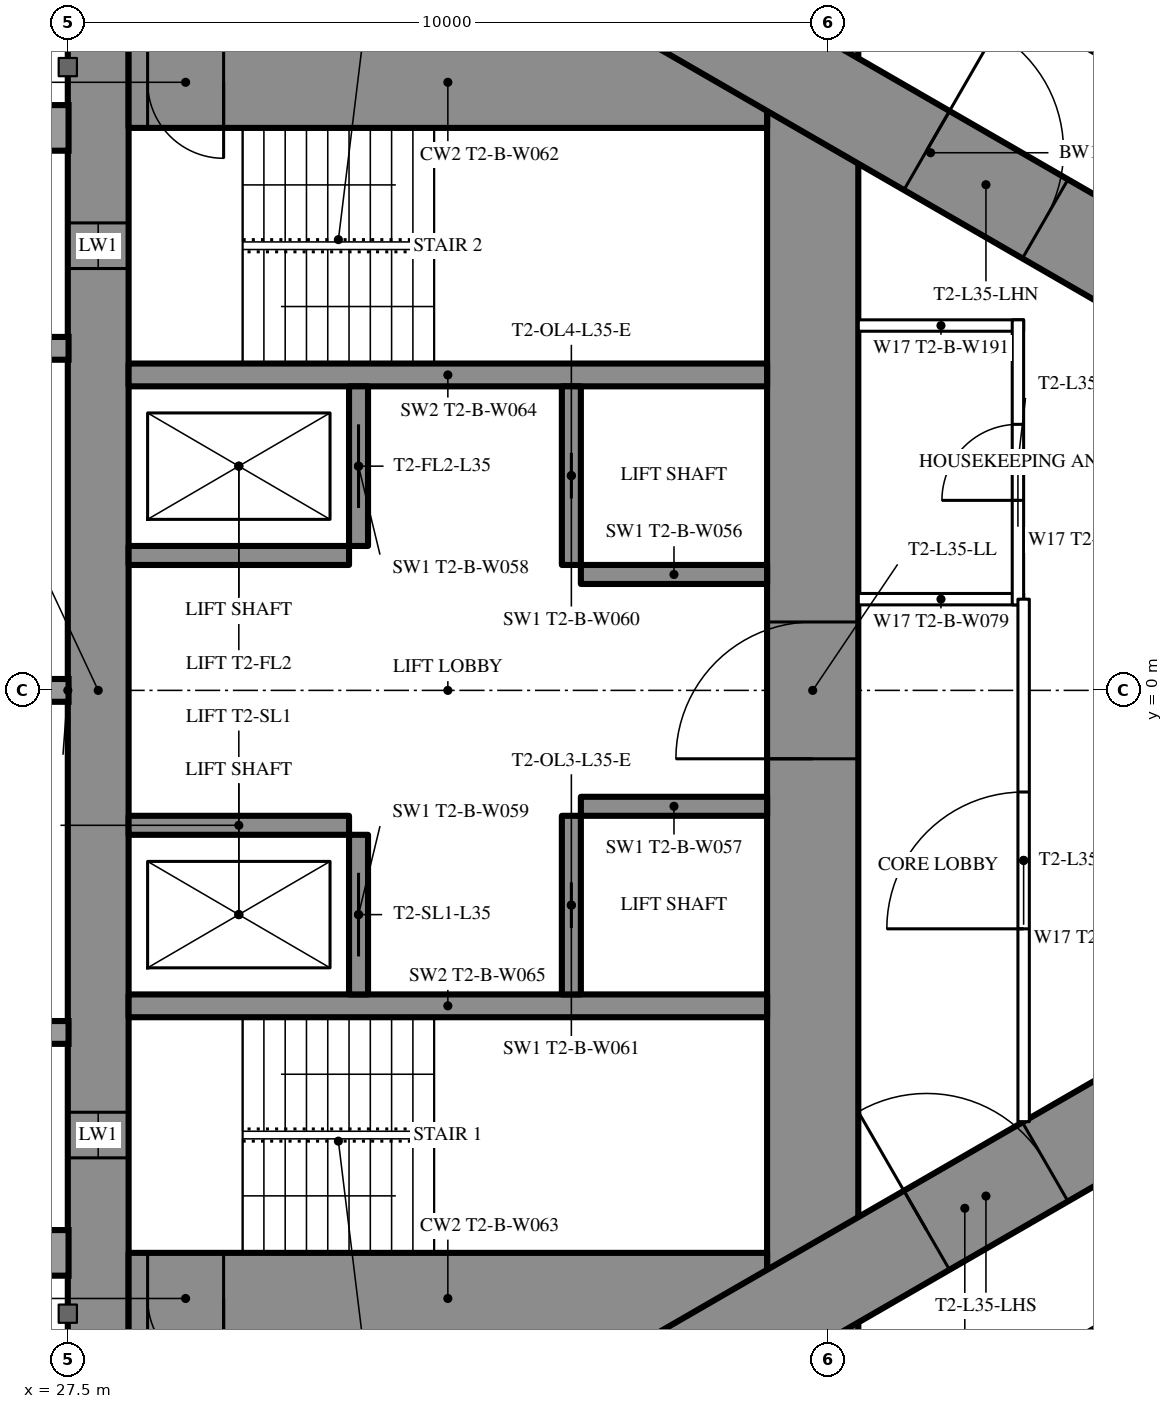
"""IFC4 building model, lengths in metres.
Left out: names, types, materials, properties, quantities, classifications, styles, units other than length and angle.
Written with IfcOpenShell. Run it as: python <this file> out.ifc"""

import sys

from ifc_helpers import new_model, si_unit, direction, frame, frame_2d, origin, place, context, subcontext, project, spatial, rectangle, extrude, element, fill, save


model = new_model("IFC4")
c1 = context("Model", 3, precision=1e-05, world=origin(), true_north=direction((0.0, 1.0)))
c2 = subcontext(c1, "Body", "Model", "MODEL_VIEW")
j1 = project(units=[si_unit("LENGTHUNIT", "METRE"), si_unit("PLANEANGLEUNIT", "RADIAN")], contexts=[c1])
p1 = place(None, origin())
s1 = spatial("IfcSite", under=j1, at=p1, CompositionType="ELEMENT")
p2 = place(p1, origin())
s2 = spatial("IfcBuilding", under=s1, at=p2, CompositionType="ELEMENT")
p3 = place(p2, frame((0.0, 0.0, 132.6)))
s3 = spatial("IfcBuildingStorey", under=s2, at=p3, CompositionType="ELEMENT", Elevation=132.6)
p4 = place(p3, frame((27.9, -8.6, 0.0), z_axis=(0.0, 0.0, 1.0), x_axis=(0.0, 1.0, 0.0)))
e1 = element("IfcWall", 1, at=p4, inside=s3, PredefinedType="SHEAR", context=c2, shape_type="SweptSolid", body=[
    extrude(rectangle(XDim=17.2, YDim=0.8, at=frame_2d((8.6, 0.0))), origin(), (0.0, 0.0, 1.0), 3.5),
])
p5 = place(p4, frame((2.45, 0.0, 0.6)))
e2 = element("IfcOpeningElement", 2, at=p5, cuts=e1, PredefinedType="OPENING", context=c2, shape_type="SweptSolid", body=[
    extrude(rectangle(XDim=0.6, YDim=2.1, at=frame_2d((0.3, 1.05))), frame((0.0, 0.41, 0.0), z_axis=(0.0, -1.0, 0.0), x_axis=(1.0, 0.0, 0.0)), (0.0, 0.0, 1.0), 0.82),
])
p6 = place(p4, frame((14.15, 0.0, 0.6)))
e3 = element("IfcOpeningElement", 3, at=p6, cuts=e1, PredefinedType="OPENING", context=c2, shape_type="SweptSolid", body=[
    extrude(rectangle(XDim=0.6, YDim=2.1, at=frame_2d((0.3, 1.05))), frame((0.0, 0.41, 0.0), z_axis=(0.0, -1.0, 0.0), x_axis=(1.0, 0.0, 0.0)), (0.0, 0.0, 1.0), 0.82),
])
p7 = place(p3, frame((37.3, -8.6, 0.0), z_axis=(0.0, 0.0, 1.0), x_axis=(0.0, 1.0, 0.0)))
e4 = element("IfcWall", 4, at=p7, inside=s3, PredefinedType="SHEAR", context=c2, shape_type="SweptSolid", body=[
    extrude(rectangle(XDim=17.2, YDim=1.2, at=frame_2d((8.6, 0.0))), origin(), (0.0, 0.0, 1.0), 3.5),
])
p8 = place(p7, frame((7.7, 0.0, 0.0)))
e5 = element("IfcOpeningElement", 5, at=p8, cuts=e4, PredefinedType="OPENING", context=c2, shape_type="SweptSolid", body=[
    extrude(rectangle(XDim=1.8, YDim=2.2, at=frame_2d((0.9, 1.1))), frame((0.0, 0.61, 0.0), z_axis=(0.0, -1.0, 0.0), x_axis=(1.0, 0.0, 0.0)), (0.0, 0.0, 1.0), 1.22),
])
p9 = place(p3, frame((28.3, -8.0, 0.0), z_axis=(0.0, 0.0, 1.0), x_axis=(1.0, 0.0, 0.0)))
e6 = element("IfcWall", 6, at=p9, inside=s3, PredefinedType="SHEAR", context=c2, shape_type="SweptSolid", body=[
    extrude(rectangle(XDim=8.4, YDim=1.2, at=frame_2d((4.2, 0.0))), origin(), (0.0, 0.0, 1.0), 3.5),
])
p10 = place(p9, frame((0.25, 0.0, 0.0)))
e7 = element("IfcOpeningElement", 7, at=p10, cuts=e6, PredefinedType="OPENING", context=c2, shape_type="SweptSolid", body=[
    extrude(rectangle(XDim=1.0, YDim=2.2, at=frame_2d((0.5, 1.1))), frame((0.0, 0.61, 0.0), z_axis=(0.0, -1.0, 0.0), x_axis=(1.0, 0.0, 0.0)), (0.0, 0.0, 1.0), 1.22),
])
p11 = place(p3, frame((28.3, 8.0, 0.0), z_axis=(0.0, 0.0, 1.0), x_axis=(1.0, 0.0, 0.0)))
e8 = element("IfcWall", 8, at=p11, inside=s3, PredefinedType="SHEAR", context=c2, shape_type="SweptSolid", body=[
    extrude(rectangle(XDim=8.4, YDim=1.2, at=frame_2d((4.2, 0.0))), origin(), (0.0, 0.0, 1.0), 3.5),
])
p12 = place(p11, frame((0.25, 0.0, 0.0)))
e9 = element("IfcOpeningElement", 9, at=p12, cuts=e8, PredefinedType="OPENING", context=c2, shape_type="SweptSolid", body=[
    extrude(rectangle(XDim=1.0, YDim=2.2, at=frame_2d((0.5, 1.1))), frame((0.0, 0.61, 0.0), z_axis=(0.0, -1.0, 0.0), x_axis=(1.0, 0.0, 0.0)), (0.0, 0.0, 1.0), 1.22),
])
for number, where, z_axis, x_axis in (
    (10, (28.3, -4.15, 0.0), (0.0, 0.0, 1.0), (1.0, 0.0, 0.0)),
    (11, (28.3, 4.15, 0.0), (0.0, 0.0, 1.0), (1.0, 0.0, 0.0)),
):
    element("IfcWall", number, at=place(p3, frame(where, z_axis=z_axis, x_axis=x_axis)), inside=s3, PredefinedType="SHEAR", context=c2, shape_type="SweptSolid", body=[
        extrude(rectangle(XDim=8.4, YDim=0.3, at=frame_2d((4.2, 0.0))), origin(), (0.0, 0.0, 1.0), 3.5),
    ])
p13 = place(p3, frame((31.325, -4.0, 0.0), z_axis=(0.0, 0.0, 1.0), x_axis=(0.0, 1.0, 0.0)))
e12 = element("IfcWall", 12, at=p13, inside=s3, PredefinedType="SHEAR", context=c2, shape_type="SweptSolid", body=[
    extrude(rectangle(XDim=2.1, YDim=0.25, at=frame_2d((1.05, 0.0))), origin(), (0.0, 0.0, 1.0), 3.5),
])
p14 = place(p13, frame((0.5, 0.0, 0.0)))
e13 = element("IfcOpeningElement", 13, at=p14, cuts=e12, PredefinedType="OPENING", context=c2, shape_type="SweptSolid", body=[
    extrude(rectangle(XDim=1.1, YDim=2.2, at=frame_2d((0.55, 1.1))), frame((0.0, 0.135, 0.0), z_axis=(0.0, -1.0, 0.0), x_axis=(1.0, 0.0, 0.0)), (0.0, 0.0, 1.0), 0.27),
])
p15 = place(p3, frame((34.125, -4.0, 0.0), z_axis=(0.0, 0.0, 1.0), x_axis=(0.0, 1.0, 0.0)))
e14 = element("IfcWall", 14, at=p15, inside=s3, PredefinedType="SHEAR", context=c2, shape_type="SweptSolid", body=[
    extrude(rectangle(XDim=2.35, YDim=0.25, at=frame_2d((1.175, 0.0))), origin(), (0.0, 0.0, 1.0), 3.5),
])
p16 = place(p15, frame((0.875, 0.0, 0.0)))
e15 = element("IfcOpeningElement", 15, at=p16, cuts=e14, PredefinedType="OPENING", context=c2, shape_type="SweptSolid", body=[
    extrude(rectangle(XDim=0.6, YDim=2.0, at=frame_2d((0.3, 1.0))), frame((0.0, 0.135, 0.0), z_axis=(0.0, -1.0, 0.0), x_axis=(1.0, 0.0, 0.0)), (0.0, 0.0, 1.0), 0.27),
])
p17 = place(p3, frame((28.3, -1.775, 0.0), z_axis=(0.0, 0.0, 1.0), x_axis=(1.0, 0.0, 0.0)))
e16 = element("IfcWall", 16, at=p17, inside=s3, PredefinedType="SHEAR", context=c2, shape_type="SweptSolid", body=[
    extrude(rectangle(XDim=2.9, YDim=0.25, at=frame_2d((1.45, 0.0))), origin(), (0.0, 0.0, 1.0), 3.5),
])
p18 = place(p3, frame((34.25, -1.525, 0.0), z_axis=(0.0, 0.0, 1.0), x_axis=(1.0, 0.0, 0.0)))
e17 = element("IfcWall", 17, at=p18, inside=s3, PredefinedType="SHEAR", context=c2, shape_type="SweptSolid", body=[
    extrude(rectangle(XDim=2.45, YDim=0.25, at=frame_2d((1.225, 0.0))), origin(), (0.0, 0.0, 1.0), 3.5),
])
p19 = place(p3, frame((31.325, 1.9, 0.0), z_axis=(0.0, 0.0, 1.0), x_axis=(0.0, 1.0, 0.0)))
e18 = element("IfcWall", 18, at=p19, inside=s3, PredefinedType="SHEAR", context=c2, shape_type="SweptSolid", body=[
    extrude(rectangle(XDim=2.1, YDim=0.25, at=frame_2d((1.05, 0.0))), origin(), (0.0, 0.0, 1.0), 3.5),
])
p20 = place(p19, frame((0.5, 0.0, 0.0)))
e19 = element("IfcOpeningElement", 19, at=p20, cuts=e18, PredefinedType="OPENING", context=c2, shape_type="SweptSolid", body=[
    extrude(rectangle(XDim=1.1, YDim=2.2, at=frame_2d((0.55, 1.1))), frame((0.0, 0.135, 0.0), z_axis=(0.0, -1.0, 0.0), x_axis=(1.0, 0.0, 0.0)), (0.0, 0.0, 1.0), 0.27),
])
p21 = place(p3, frame((34.125, 1.65, 0.0), z_axis=(0.0, 0.0, 1.0), x_axis=(0.0, 1.0, 0.0)))
e20 = element("IfcWall", 20, at=p21, inside=s3, PredefinedType="SHEAR", context=c2, shape_type="SweptSolid", body=[
    extrude(rectangle(XDim=2.35, YDim=0.25, at=frame_2d((1.175, 0.0))), origin(), (0.0, 0.0, 1.0), 3.5),
])
p22 = place(p21, frame((0.875, 0.0, 0.0)))
e21 = element("IfcOpeningElement", 21, at=p22, cuts=e20, PredefinedType="OPENING", context=c2, shape_type="SweptSolid", body=[
    extrude(rectangle(XDim=0.6, YDim=2.0, at=frame_2d((0.3, 1.0))), frame((0.0, 0.135, 0.0), z_axis=(0.0, -1.0, 0.0), x_axis=(1.0, 0.0, 0.0)), (0.0, 0.0, 1.0), 0.27),
])
p23 = place(p3, frame((28.3, 1.775, 0.0), z_axis=(0.0, 0.0, 1.0), x_axis=(1.0, 0.0, 0.0)))
e22 = element("IfcWall", 22, at=p23, inside=s3, PredefinedType="SHEAR", context=c2, shape_type="SweptSolid", body=[
    extrude(rectangle(XDim=2.9, YDim=0.25, at=frame_2d((1.45, 0.0))), origin(), (0.0, 0.0, 1.0), 3.5),
])
p24 = place(p3, frame((34.25, 1.525, 0.0), z_axis=(0.0, 0.0, 1.0), x_axis=(1.0, 0.0, 0.0)))
e23 = element("IfcWall", 23, at=p24, inside=s3, PredefinedType="SHEAR", context=c2, shape_type="SweptSolid", body=[
    extrude(rectangle(XDim=2.45, YDim=0.25, at=frame_2d((1.225, 0.0))), origin(), (0.0, 0.0, 1.0), 3.5),
])
p25 = place(p3, frame((27.2, -13.8, 0.0), z_axis=(0.0, 0.0, 1.0), x_axis=(0.866027159892, 0.499996958321, 0.0)))
e24 = element("IfcWall", 24, at=p25, inside=s3, PredefinedType="SHEAR", context=c2, shape_type="SweptSolid", body=[
    extrude(rectangle(XDim=27.947, YDim=1.2, at=frame_2d((13.973, 0.0))), origin(), (0.0, 0.0, 1.0), 3.5),
])
p26 = place(p25, frame((4.6, 0.0, 0.0)))
e25 = element("IfcOpeningElement", 25, at=p26, cuts=e24, PredefinedType="OPENING", context=c2, shape_type="SweptSolid", body=[
    extrude(rectangle(XDim=1.0, YDim=2.2, at=frame_2d((0.5, 1.1))), frame((0.0, 0.61, 0.0), z_axis=(0.0, -1.0, 0.0), x_axis=(1.0, 0.0, 0.0)), (0.0, 0.0, 1.0), 1.22),
])
p27 = place(p25, frame((13.395, 0.0, 0.0)))
e26 = element("IfcOpeningElement", 26, at=p27, cuts=e24, PredefinedType="OPENING", context=c2, shape_type="SweptSolid", body=[
    extrude(rectangle(XDim=1.8, YDim=2.2, at=frame_2d((0.9, 1.1))), frame((0.0, 0.61, 0.0), z_axis=(0.0, -1.0, 0.0), x_axis=(1.0, 0.0, 0.0)), (0.0, 0.0, 1.0), 1.22),
])
p28 = place(p3, frame((27.2, 13.8, 0.0), z_axis=(0.0, 0.0, 1.0), x_axis=(0.866024515034, -0.500001539357, 0.0)))
e27 = element("IfcWall", 27, at=p28, inside=s3, PredefinedType="SHEAR", context=c2, shape_type="SweptSolid", body=[
    extrude(rectangle(XDim=26.907, YDim=1.2, at=frame_2d((13.454, 0.0))), origin(), (0.0, 0.0, 1.0), 3.5),
])
p29 = place(p28, frame((4.6, 0.0, 0.0)))
e28 = element("IfcOpeningElement", 28, at=p29, cuts=e27, PredefinedType="OPENING", context=c2, shape_type="SweptSolid", body=[
    extrude(rectangle(XDim=1.0, YDim=2.2, at=frame_2d((0.5, 1.1))), frame((0.0, 0.61, 0.0), z_axis=(0.0, -1.0, 0.0), x_axis=(1.0, 0.0, 0.0)), (0.0, 0.0, 1.0), 1.22),
])
p30 = place(p28, frame((13.395, 0.0, 0.0)))
e29 = element("IfcOpeningElement", 29, at=p30, cuts=e27, PredefinedType="OPENING", context=c2, shape_type="SweptSolid", body=[
    extrude(rectangle(XDim=1.8, YDim=2.2, at=frame_2d((0.9, 1.1))), frame((0.0, 0.61, 0.0), z_axis=(0.0, -1.0, 0.0), x_axis=(1.0, 0.0, 0.0)), (0.0, 0.0, 1.0), 1.22),
])
p31 = place(p3, frame((37.96, -10.243, 0.0), z_axis=(0.0, 0.0, 1.0), x_axis=(0.866026429433, 0.499998223521, 0.0)))
e30 = element("IfcWall", 30, at=p31, inside=s3, PredefinedType="PARTITIONING", context=c2, shape_type="SweptSolid", body=[
    extrude(rectangle(XDim=20.487, YDim=0.2, at=frame_2d((10.243, 0.0))), origin(), (0.0, 0.0, 1.0), 3.25),
])
p32 = place(p31, frame((10.743, 0.0, 0.0)))
e31 = element("IfcOpeningElement", 31, at=p32, cuts=e30, PredefinedType="OPENING", context=c2, shape_type="SweptSolid", body=[
    extrude(rectangle(XDim=0.95, YDim=2.2, at=frame_2d((0.475, 1.1))), frame((0.0, 0.11, 0.0), z_axis=(0.0, -1.0, 0.0), x_axis=(1.0, 0.0, 0.0)), (0.0, 0.0, 1.0), 0.22),
])
p33 = place(p31, frame((17.586, 0.0, 0.0)))
e32 = element("IfcOpeningElement", 32, at=p33, cuts=e30, PredefinedType="OPENING", context=c2, shape_type="SweptSolid", body=[
    extrude(rectangle(XDim=1.8, YDim=2.2, at=frame_2d((0.9, 1.1))), frame((0.0, 0.11, 0.0), z_axis=(0.0, -1.0, 0.0), x_axis=(1.0, 0.0, 0.0)), (0.0, 0.0, 1.0), 0.22),
])
p34 = place(p31, frame((0.6, 0.0, 0.0)))
e33 = element("IfcOpeningElement", 33, at=p34, cuts=e30, PredefinedType="OPENING", context=c2, shape_type="SweptSolid", body=[
    extrude(rectangle(XDim=0.95, YDim=2.2, at=frame_2d((0.475, 1.1))), frame((0.0, 0.11, 0.0), z_axis=(0.0, -1.0, 0.0), x_axis=(1.0, 0.0, 0.0)), (0.0, 0.0, 1.0), 0.22),
])
p35 = place(p3, frame((36.834, 10.894, 0.0), z_axis=(0.0, 0.0, 1.0), x_axis=(0.866028157229, -0.499995230863, 0.0)))
e34 = element("IfcWall", 34, at=p35, inside=s3, PredefinedType="PARTITIONING", context=c2, shape_type="SweptSolid", body=[
    extrude(rectangle(XDim=21.667, YDim=0.2, at=frame_2d((10.833, 0.0))), origin(), (0.0, 0.0, 1.0), 3.25),
])
p36 = place(p35, frame((20.117, 0.0, 0.0)))
e35 = element("IfcOpeningElement", 35, at=p36, cuts=e34, PredefinedType="OPENING", context=c2, shape_type="SweptSolid", body=[
    extrude(rectangle(XDim=0.95, YDim=2.2, at=frame_2d((0.475, 1.1))), frame((0.0, 0.11, 0.0), z_axis=(0.0, -1.0, 0.0), x_axis=(1.0, 0.0, 0.0)), (0.0, 0.0, 1.0), 0.22),
])
p37 = place(p35, frame((14.938, 0.0, 0.0)))
e36 = element("IfcOpeningElement", 36, at=p37, cuts=e34, PredefinedType="OPENING", context=c2, shape_type="SweptSolid", body=[
    extrude(rectangle(XDim=1.8, YDim=2.2, at=frame_2d((0.9, 1.1))), frame((0.0, 0.11, 0.0), z_axis=(0.0, -1.0, 0.0), x_axis=(1.0, 0.0, 0.0)), (0.0, 0.0, 1.0), 0.22),
])
p38 = place(p35, frame((9.99, 0.0, 0.0)))
e37 = element("IfcOpeningElement", 37, at=p38, cuts=e34, PredefinedType="OPENING", context=c2, shape_type="SweptSolid", body=[
    extrude(rectangle(XDim=0.95, YDim=2.2, at=frame_2d((0.475, 1.1))), frame((0.0, 0.11, 0.0), z_axis=(0.0, -1.0, 0.0), x_axis=(1.0, 0.0, 0.0)), (0.0, 0.0, 1.0), 0.22),
])
p39 = place(p35, frame((3.35, 0.0, 0.0)))
e38 = element("IfcOpeningElement", 38, at=p39, cuts=e34, PredefinedType="OPENING", context=c2, shape_type="SweptSolid", body=[
    extrude(rectangle(XDim=1.0, YDim=2.2, at=frame_2d((0.5, 1.1))), frame((0.0, 0.11, 0.0), z_axis=(0.0, -1.0, 0.0), x_axis=(1.0, 0.0, 0.0)), (0.0, 0.0, 1.0), 0.22),
])
for number, where, z_axis, x_axis in (
    (39, (37.9, 1.2, 0.0), (0.0, 0.0, 1.0), (1.0, 0.0, 0.0)),
    (40, (37.9, 4.8, 0.0), (0.0, 0.0, 1.0), (1.0, 0.0, 0.0)),
):
    element("IfcWall", number, at=place(p3, frame(where, z_axis=z_axis, x_axis=x_axis)), inside=s3, PredefinedType="PARTITIONING", context=c2, shape_type="SweptSolid", body=[
        extrude(rectangle(XDim=2.175, YDim=0.15, at=frame_2d((1.087, 0.0))), origin(), (0.0, 0.0, 1.0), 3.25),
    ])
p40 = place(p3, frame((40.0, 1.125, 0.0), z_axis=(0.0, 0.0, 1.0), x_axis=(0.0, 1.0, 0.0)))
e41 = element("IfcWall", 41, at=p40, inside=s3, PredefinedType="PARTITIONING", context=c2, shape_type="SweptSolid", body=[
    extrude(rectangle(XDim=3.75, YDim=0.15, at=frame_2d((1.875, 0.0))), origin(), (0.0, 0.0, 1.0), 3.25),
])
p41 = place(p40, frame((1.375, 0.0, 0.0)))
e42 = element("IfcOpeningElement", 42, at=p41, cuts=e41, PredefinedType="OPENING", context=c2, shape_type="SweptSolid", body=[
    extrude(rectangle(XDim=1.0, YDim=2.2, at=frame_2d((0.5, 1.1))), frame((0.0, 0.085, 0.0), z_axis=(0.0, -1.0, 0.0), x_axis=(1.0, 0.0, 0.0)), (0.0, 0.0, 1.0), 0.17),
])
p42 = place(p3, frame((40.075, -5.674, 0.0), z_axis=(0.0, 0.0, 1.0), x_axis=(0.0, 1.0, 0.0)))
e43 = element("IfcWall", 43, at=p42, inside=s3, PredefinedType="PARTITIONING", context=c2, shape_type="SweptSolid", body=[
    extrude(rectangle(XDim=6.874, YDim=0.15, at=frame_2d((3.437, 0.0))), origin(), (0.0, 0.0, 1.0), 3.25),
])
p43 = place(p42, frame((2.537, 0.0, 0.0)))
e44 = element("IfcOpeningElement", 44, at=p43, cuts=e43, PredefinedType="OPENING", context=c2, shape_type="SweptSolid", body=[
    extrude(rectangle(XDim=1.8, YDim=2.2, at=frame_2d((0.9, 1.1))), frame((0.0, 0.085, 0.0), z_axis=(0.0, -1.0, 0.0), x_axis=(1.0, 0.0, 0.0)), (0.0, 0.0, 1.0), 0.17),
])
p44 = place(p41, origin())
e45 = element("IfcDoor", 45, at=p44, inside=s3, OperationType="SINGLE_SWING_LEFT", PredefinedType="DOOR", context=c2, shape_type="SweptSolid", body=[
    extrude(rectangle(XDim=1.0, YDim=2.2, at=frame_2d((0.5, 1.1))), frame((0.0, 0.025, 0.0), z_axis=(0.0, -1.0, 0.0), x_axis=(1.0, 0.0, 0.0)), (0.0, 0.0, 1.0), 0.05),
])
fill(e42, e45)
p45 = place(p43, origin())
e46 = element("IfcDoor", 46, at=p45, inside=s3, OperationType="DOUBLE_DOOR_SINGLE_SWING", PredefinedType="DOOR", context=c2, shape_type="SweptSolid", body=[
    extrude(rectangle(XDim=1.8, YDim=2.2, at=frame_2d((0.9, 1.1))), frame((0.0, 0.025, 0.0), z_axis=(0.0, -1.0, 0.0), x_axis=(1.0, 0.0, 0.0)), (0.0, 0.0, 1.0), 0.05),
])
fill(e44, e46)
p46 = place(p27, origin())
e47 = element("IfcDoor", 47, at=p46, inside=s3, OperationType="DOUBLE_DOOR_SINGLE_SWING", PredefinedType="DOOR", context=c2, shape_type="SweptSolid", body=[
    extrude(rectangle(XDim=1.8, YDim=2.2, at=frame_2d((0.9, 1.1))), frame((0.0, 0.025, 0.0), z_axis=(0.0, -1.0, 0.0), x_axis=(1.0, 0.0, 0.0)), (0.0, 0.0, 1.0), 0.05),
])
fill(e26, e47)
p47 = place(p30, origin())
e48 = element("IfcDoor", 48, at=p47, inside=s3, OperationType="DOUBLE_DOOR_SINGLE_SWING", PredefinedType="DOOR", context=c2, shape_type="SweptSolid", body=[
    extrude(rectangle(XDim=1.8, YDim=2.2, at=frame_2d((0.9, 1.1))), frame((0.0, 0.025, 0.0), z_axis=(0.0, -1.0, 0.0), x_axis=(1.0, 0.0, 0.0)), (0.0, 0.0, 1.0), 0.05),
])
fill(e29, e48)
p48 = place(p8, origin())
e49 = element("IfcDoor", 49, at=p48, inside=s3, OperationType="DOUBLE_DOOR_SINGLE_SWING", PredefinedType="DOOR", context=c2, shape_type="SweptSolid", body=[
    extrude(rectangle(XDim=1.8, YDim=2.2, at=frame_2d((0.9, 1.1))), frame((0.0, 0.025, 0.0), z_axis=(0.0, -1.0, 0.0), x_axis=(1.0, 0.0, 0.0)), (0.0, 0.0, 1.0), 0.05),
])
fill(e5, e49)
p49 = place(p10, origin())
e50 = element("IfcDoor", 50, at=p49, inside=s3, OperationType="SINGLE_SWING_RIGHT", PredefinedType="DOOR", context=c2, shape_type="SweptSolid", body=[
    extrude(rectangle(XDim=1.0, YDim=2.2, at=frame_2d((0.5, 1.1))), frame((0.0, 0.025, 0.0), z_axis=(0.0, -1.0, 0.0), x_axis=(1.0, 0.0, 0.0)), (0.0, 0.0, 1.0), 0.05),
])
fill(e7, e50)
p50 = place(p12, origin())
e51 = element("IfcDoor", 51, at=p50, inside=s3, OperationType="SINGLE_SWING_RIGHT", PredefinedType="DOOR", context=c2, shape_type="SweptSolid", body=[
    extrude(rectangle(XDim=1.0, YDim=2.2, at=frame_2d((0.5, 1.1))), frame((0.0, 0.025, 0.0), z_axis=(0.0, -1.0, 0.0), x_axis=(1.0, 0.0, 0.0)), (0.0, 0.0, 1.0), 0.05),
])
fill(e9, e51)
p51 = place(p14, origin())
e52 = element("IfcDoor", 52, at=p51, inside=s3, OperationType="SLIDING_TO_LEFT", PredefinedType="USERDEFINED", context=c2, shape_type="SweptSolid", body=[
    extrude(rectangle(XDim=1.1, YDim=2.2, at=frame_2d((0.55, 1.1))), frame((0.0, 0.025, 0.0), z_axis=(0.0, -1.0, 0.0), x_axis=(1.0, 0.0, 0.0)), (0.0, 0.0, 1.0), 0.05),
])
fill(e13, e52)
p52 = place(p20, origin())
e53 = element("IfcDoor", 53, at=p52, inside=s3, OperationType="SLIDING_TO_LEFT", PredefinedType="USERDEFINED", context=c2, shape_type="SweptSolid", body=[
    extrude(rectangle(XDim=1.1, YDim=2.2, at=frame_2d((0.55, 1.1))), frame((0.0, 0.025, 0.0), z_axis=(0.0, -1.0, 0.0), x_axis=(1.0, 0.0, 0.0)), (0.0, 0.0, 1.0), 0.05),
])
fill(e19, e53)
p53 = place(p16, origin())
e54 = element("IfcDoor", 54, at=p53, inside=s3, OperationType="SLIDING_TO_LEFT", PredefinedType="DOOR", context=c2, shape_type="SweptSolid", body=[
    extrude(rectangle(XDim=0.6, YDim=2.0, at=frame_2d((0.3, 1.0))), frame((0.0, 0.025, 0.0), z_axis=(0.0, -1.0, 0.0), x_axis=(1.0, 0.0, 0.0)), (0.0, 0.0, 1.0), 0.05),
])
fill(e15, e54)
p54 = place(p22, origin())
e55 = element("IfcDoor", 55, at=p54, inside=s3, OperationType="SLIDING_TO_LEFT", PredefinedType="DOOR", context=c2, shape_type="SweptSolid", body=[
    extrude(rectangle(XDim=0.6, YDim=2.0, at=frame_2d((0.3, 1.0))), frame((0.0, 0.025, 0.0), z_axis=(0.0, -1.0, 0.0), x_axis=(1.0, 0.0, 0.0)), (0.0, 0.0, 1.0), 0.05),
])
fill(e21, e55)
p55 = place(p5, origin())
e56 = element("IfcWindow", 56, at=p55, inside=s3, PartitioningType="SINGLE_PANEL", PredefinedType="WINDOW", context=c2, shape_type="SweptSolid", body=[
    extrude(rectangle(XDim=0.6, YDim=2.1, at=frame_2d((0.3, 1.05))), frame((0.0, 0.03, 0.0), z_axis=(0.0, -1.0, 0.0), x_axis=(1.0, 0.0, 0.0)), (0.0, 0.0, 1.0), 0.06),
])
fill(e2, e56)
p56 = place(p6, origin())
e57 = element("IfcWindow", 57, at=p56, inside=s3, PartitioningType="SINGLE_PANEL", PredefinedType="WINDOW", context=c2, shape_type="SweptSolid", body=[
    extrude(rectangle(XDim=0.6, YDim=2.1, at=frame_2d((0.3, 1.05))), frame((0.0, 0.03, 0.0), z_axis=(0.0, -1.0, 0.0), x_axis=(1.0, 0.0, 0.0)), (0.0, 0.0, 1.0), 0.06),
])
fill(e3, e57)
save(model, sys.argv[1])
